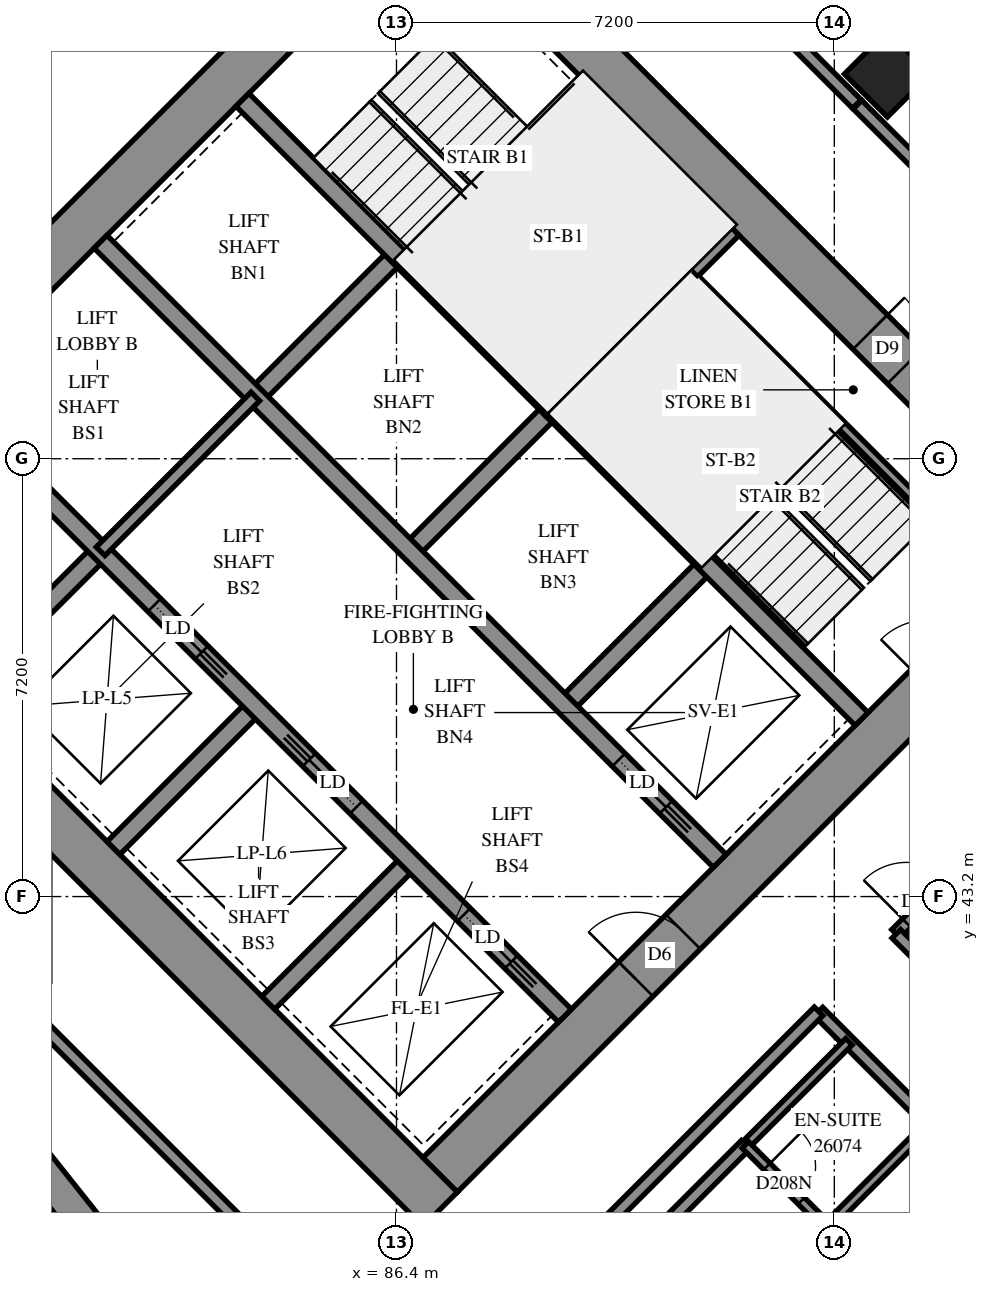
"""IFC4 building model, lengths in metres.
Left out: names, types, materials, properties, quantities, classifications, styles, units other than length and angle.
Written with IfcOpenShell. Run it as: python <this file> out.ifc"""

import sys

from ifc_helpers import new_model, si_unit, direction, frame, frame_2d, origin, origin_2d, place, context, subcontext, project, spatial, polyline, rectangle, outline, extrude, element, fill, save


model = new_model("IFC4")
c1 = context("Model", 3, precision=1e-05, world=origin(), true_north=direction((0.0, 1.0)))
c2 = subcontext(c1, "Body", "Model", "MODEL_VIEW")
j1 = project(units=[si_unit("LENGTHUNIT", "METRE"), si_unit("PLANEANGLEUNIT", "RADIAN")], contexts=[c1])
p1 = place(None, origin())
s1 = spatial("IfcSite", under=j1, at=p1, CompositionType="ELEMENT")
p2 = place(p1, origin())
s2 = spatial("IfcBuilding", under=s1, at=p2, CompositionType="ELEMENT")
p3 = place(p2, frame((0.0, 0.0, 98.2)))
s3 = spatial("IfcBuildingStorey", under=s2, at=p3, CompositionType="ELEMENT", Elevation=98.2)
p4 = place(p3, frame((94.474, 56.727, 0.0), z_axis=(0.0, 0.0, 1.0), x_axis=(0.7071067812, -0.7071067812, 0.0)))
e1 = element("IfcColumn", 1, at=p4, inside=s3, PredefinedType="COLUMN", context=c2, shape_type="SweptSolid", body=[
    extrude(rectangle(XDim=1.0, YDim=1.0, at=origin_2d()), origin(), (0.0, 0.0, 1.0), 3.1),
])
p5 = place(p3, frame((75.806, 49.373, -0.3), z_axis=(0.0, 0.0, 1.0), x_axis=(0.7071067812, -0.7071067812, 0.0)))
e2 = element("IfcWall", 2, at=p5, inside=s3, PredefinedType="SHEAR", context=c2, shape_type="SweptSolid", body=[
    extrude(rectangle(XDim=16.0, YDim=0.8, at=frame_2d((8.0, 0.0))), origin(), (0.0, 0.0, 1.0), 2.7),
])
p6 = place(p3, frame((86.554, 60.121, -0.3), z_axis=(0.0, 0.0, 1.0), x_axis=(0.7071067812, -0.7071067812, 0.0)))
e3 = element("IfcWall", 3, at=p6, inside=s3, PredefinedType="SHEAR", context=c2, shape_type="SweptSolid", body=[
    extrude(rectangle(XDim=16.0, YDim=0.8, at=frame_2d((8.0, 0.0))), origin(), (0.0, 0.0, 1.0), 2.7),
])
p7 = place(p6, frame((10.8, 0.0, 0.3)))
e4 = element("IfcOpeningElement", 4, at=p7, cuts=e3, PredefinedType="OPENING", context=c2, shape_type="SweptSolid", body=[
    extrude(rectangle(XDim=0.8, YDim=2.1, at=frame_2d((0.4, 1.05))), frame((0.0, 0.41, 0.0), z_axis=(0.0, -1.0, 0.0), x_axis=(1.0, 0.0, 0.0)), (0.0, 0.0, 1.0), 0.82),
])
p8 = place(p3, frame((76.372, 49.373, -0.3), z_axis=(0.0, 0.0, 1.0), x_axis=(0.7071067812, 0.7071067812, 0.0)))
e5 = element("IfcWall", 5, at=p8, inside=s3, PredefinedType="SHEAR", context=c2, shape_type="SweptSolid", body=[
    extrude(rectangle(XDim=14.4, YDim=0.8, at=frame_2d((7.2, 0.0))), origin(), (0.0, 0.0, 1.0), 2.7),
])
p9 = place(p8, frame((4.55, 0.0, 0.3)))
e6 = element("IfcOpeningElement", 6, at=p9, cuts=e5, PredefinedType="OPENING", context=c2, shape_type="SweptSolid", body=[
    extrude(rectangle(XDim=1.1, YDim=2.1, at=frame_2d((0.55, 1.05))), frame((0.0, 0.41, 0.0), z_axis=(0.0, -1.0, 0.0), x_axis=(1.0, 0.0, 0.0)), (0.0, 0.0, 1.0), 0.82),
])
p10 = place(p8, frame((11.35, 0.0, 0.3)))
e7 = element("IfcOpeningElement", 7, at=p10, cuts=e5, PredefinedType="OPENING", context=c2, shape_type="SweptSolid", body=[
    extrude(rectangle(XDim=1.1, YDim=2.1, at=frame_2d((0.55, 1.05))), frame((0.0, 0.41, 0.0), z_axis=(0.0, -1.0, 0.0), x_axis=(1.0, 0.0, 0.0)), (0.0, 0.0, 1.0), 0.82),
])
p11 = place(p3, frame((87.12, 38.625, -0.3), z_axis=(0.0, 0.0, 1.0), x_axis=(0.7071067812, 0.7071067812, 0.0)))
e8 = element("IfcWall", 8, at=p11, inside=s3, PredefinedType="SHEAR", context=c2, shape_type="SweptSolid", body=[
    extrude(rectangle(XDim=14.4, YDim=0.8, at=frame_2d((7.2, 0.0))), origin(), (0.0, 0.0, 1.0), 2.7),
])
p12 = place(p11, frame((4.55, 0.0, 0.3)))
e9 = element("IfcOpeningElement", 9, at=p12, cuts=e8, PredefinedType="OPENING", context=c2, shape_type="SweptSolid", body=[
    extrude(rectangle(XDim=1.1, YDim=2.1, at=frame_2d((0.55, 1.05))), frame((0.0, 0.41, 0.0), z_axis=(0.0, -1.0, 0.0), x_axis=(1.0, 0.0, 0.0)), (0.0, 0.0, 1.0), 0.82),
])
p13 = place(p11, frame((11.35, 0.0, 0.3)))
e10 = element("IfcOpeningElement", 10, at=p13, cuts=e8, PredefinedType="OPENING", context=c2, shape_type="SweptSolid", body=[
    extrude(rectangle(XDim=1.1, YDim=2.1, at=frame_2d((0.55, 1.05))), frame((0.0, 0.41, 0.0), z_axis=(0.0, -1.0, 0.0), x_axis=(1.0, 0.0, 0.0)), (0.0, 0.0, 1.0), 0.82),
])
for number, where, z_axis, x_axis in (
    (11, (79.2, 46.544, 0.0), (0.0, 0.0, 1.0), (0.707, 0.707, 0.0)),
    (12, (84.079, 51.423, 0.0), (0.0, 0.0, 1.0), (0.707, 0.707, 0.0)),
):
    element("IfcWall", number, at=place(p3, frame(where, z_axis=z_axis, x_axis=x_axis)), inside=s3, PredefinedType="SOLIDWALL", context=c2, shape_type="SweptSolid", body=[
        extrude(rectangle(XDim=3.3, YDim=0.3, at=frame_2d((1.65, 0.0))), origin(), (0.0, 0.0, 1.0), 3.1),
    ])
p14 = place(p3, frame((81.746, 43.999, 0.0), z_axis=(0.0, 0.0, 1.0), x_axis=(0.7071067812, 0.7071067812, 0.0)))
e13 = element("IfcWall", 13, at=p14, inside=s3, PredefinedType="SOLIDWALL", context=c2, shape_type="SweptSolid", body=[
    extrude(rectangle(XDim=3.3, YDim=0.3, at=frame_2d((1.65, 0.0))), origin(), (0.0, 0.0, 1.0), 3.1),
])
p15 = place(p3, frame((86.625, 48.878, 0.0), z_axis=(0.0, 0.0, 1.0), x_axis=(0.7071067812, 0.7071067812, 0.0)))
e14 = element("IfcWall", 14, at=p15, inside=s3, PredefinedType="SOLIDWALL", context=c2, shape_type="SweptSolid", body=[
    extrude(rectangle(XDim=3.3, YDim=0.3, at=frame_2d((1.65, 0.0))), origin(), (0.0, 0.0, 1.0), 3.1),
])
p16 = place(p3, frame((84.291, 41.453, 0.0), z_axis=(0.0, 0.0, 1.0), x_axis=(0.7071067812, 0.7071067812, 0.0)))
e15 = element("IfcWall", 15, at=p16, inside=s3, PredefinedType="SOLIDWALL", context=c2, shape_type="SweptSolid", body=[
    extrude(rectangle(XDim=3.3, YDim=0.3, at=frame_2d((1.65, 0.0))), origin(), (0.0, 0.0, 1.0), 3.1),
])
p17 = place(p3, frame((89.17, 46.332, 0.0), z_axis=(0.0, 0.0, 1.0), x_axis=(0.7071067812, 0.7071067812, 0.0)))
e16 = element("IfcWall", 16, at=p17, inside=s3, PredefinedType="SOLIDWALL", context=c2, shape_type="SweptSolid", body=[
    extrude(rectangle(XDim=3.3, YDim=0.3, at=frame_2d((1.65, 0.0))), origin(), (0.0, 0.0, 1.0), 3.1),
])
p18 = place(p3, frame((78.988, 51.423, 0.0), z_axis=(0.0, 0.0, 1.0), x_axis=(0.7071067812, -0.7071067812, 0.0)))
e17 = element("IfcWall", 17, at=p18, inside=s3, PredefinedType="SOLIDWALL", context=c2, shape_type="SweptSolid", body=[
    extrude(rectangle(XDim=14.4, YDim=0.3, at=frame_2d((7.2, 0.0))), origin(), (0.0, 0.0, 1.0), 3.1),
])
p19 = place(p18, frame((1.25, 0.0, 0.0)))
e18 = element("IfcOpeningElement", 18, at=p19, cuts=e17, PredefinedType="OPENING", context=c2, shape_type="SweptSolid", body=[
    extrude(rectangle(XDim=1.1, YDim=2.1, at=frame_2d((0.55, 1.05))), frame((0.0, 0.16, 0.0), z_axis=(0.0, -1.0, 0.0), x_axis=(1.0, 0.0, 0.0)), (0.0, 0.0, 1.0), 0.32),
])
p20 = place(p18, frame((4.85, 0.0, 0.0)))
e19 = element("IfcOpeningElement", 19, at=p20, cuts=e17, PredefinedType="OPENING", context=c2, shape_type="SweptSolid", body=[
    extrude(rectangle(XDim=1.1, YDim=2.1, at=frame_2d((0.55, 1.05))), frame((0.0, 0.16, 0.0), z_axis=(0.0, -1.0, 0.0), x_axis=(1.0, 0.0, 0.0)), (0.0, 0.0, 1.0), 0.32),
])
p21 = place(p18, frame((8.45, 0.0, 0.0)))
e20 = element("IfcOpeningElement", 20, at=p21, cuts=e17, PredefinedType="OPENING", context=c2, shape_type="SweptSolid", body=[
    extrude(rectangle(XDim=1.1, YDim=2.1, at=frame_2d((0.55, 1.05))), frame((0.0, 0.16, 0.0), z_axis=(0.0, -1.0, 0.0), x_axis=(1.0, 0.0, 0.0)), (0.0, 0.0, 1.0), 0.32),
])
p22 = place(p18, frame((12.05, 0.0, 0.0)))
e21 = element("IfcOpeningElement", 21, at=p22, cuts=e17, PredefinedType="OPENING", context=c2, shape_type="SweptSolid", body=[
    extrude(rectangle(XDim=1.1, YDim=2.1, at=frame_2d((0.55, 1.05))), frame((0.0, 0.16, 0.0), z_axis=(0.0, -1.0, 0.0), x_axis=(1.0, 0.0, 0.0)), (0.0, 0.0, 1.0), 0.32),
])
p23 = place(p3, frame((81.534, 53.969, 0.0), z_axis=(0.0, 0.0, 1.0), x_axis=(0.707103309, -0.7071102534, 0.0)))
e22 = element("IfcWall", 22, at=p23, inside=s3, PredefinedType="SOLIDWALL", context=c2, shape_type="SweptSolid", body=[
    extrude(rectangle(XDim=14.4, YDim=0.3, at=frame_2d((7.2, 0.0))), origin(), (0.0, 0.0, 1.0), 3.1),
])
p24 = place(p23, frame((12.05, 0.0, 0.0)))
e23 = element("IfcOpeningElement", 23, at=p24, cuts=e22, PredefinedType="OPENING", context=c2, shape_type="SweptSolid", body=[
    extrude(rectangle(XDim=1.1, YDim=2.1, at=frame_2d((0.55, 1.05))), frame((0.0, 0.16, 0.0), z_axis=(0.0, -1.0, 0.0), x_axis=(1.0, 0.0, 0.0)), (0.0, 0.0, 1.0), 0.32),
])
for number, where, z_axis, x_axis in (
    (24, (83.867, 56.302, 0.0), (0.0, 0.0, 1.0), (0.707, -0.707, 0.0)),
    (25, (88.958, 51.211, 0.0), (0.0, 0.0, 1.0), (0.707, -0.707, 0.0)),
):
    element("IfcWall", number, at=place(p3, frame(where, z_axis=z_axis, x_axis=x_axis)), inside=s3, PredefinedType="SOLIDWALL", context=c2, shape_type="SweptSolid", body=[
        extrude(rectangle(XDim=7.2, YDim=0.3, at=frame_2d((3.6, 0.0))), origin(), (0.0, 0.0, 1.0), 3.1),
    ])
p25 = place(p3, frame((88.958, 51.211, 0.0), z_axis=(0.0, 0.0, 1.0), x_axis=(0.7071067812, 0.7071067812, 0.0)))
e26 = element("IfcWall", 26, at=p25, inside=s3, PredefinedType="SOLIDWALL", context=c2, shape_type="SweptSolid", body=[
    extrude(rectangle(XDim=4.2, YDim=0.3, at=frame_2d((2.1, 0.0))), origin(), (0.0, 0.0, 1.0), 3.1),
])
p26 = place(p3, frame((96.069, 56.436, 0.0), z_axis=(0.0, 0.0, 1.0), x_axis=(-0.6082581669, 0.7937392534, 0.0)))
e27 = element("IfcWall", 27, at=p26, inside=s3, PredefinedType="SOLIDWALL", context=c2, shape_type="SweptSolid", body=[
    extrude(outline(polyline([(0.036, -0.275), (3.475, -0.275), (3.403, 0.275), (-0.036, 0.275), (0.036, -0.275)])), origin(), (0.0, 0.0, 1.0), 3.1),
])
p27 = place(p26, frame((1.674, 0.0, 0.5)))
e28 = element("IfcOpeningElement", 28, at=p27, cuts=e27, PredefinedType="OPENING", context=c2, shape_type="SweptSolid", body=[
    extrude(rectangle(XDim=1.2, YDim=2.45, at=frame_2d((0.6, 1.225))), frame((0.0, 0.285, 0.0), z_axis=(0.0, -1.0, 0.0), x_axis=(1.0, 0.0, 0.0)), (0.0, 0.0, 1.0), 0.57),
])
p28 = place(p3, frame((80.234, 39.116, 0.0), z_axis=(0.0, 0.0, 1.0), x_axis=(0.6221724239, -0.782880243, 0.0)))
e29 = element("IfcWall", 29, at=p28, inside=s3, PredefinedType="SOLIDWALL", context=c2, shape_type="SweptSolid", body=[
    extrude(outline(polyline([(0.052, -0.275), (4.02, -0.275), (3.957, 0.275), (-0.052, 0.275), (0.052, -0.275)])), origin(), (0.0, 0.0, 1.0), 3.1),
])
p29 = place(p28, frame((1.891, 0.0, 0.5)))
e30 = element("IfcOpeningElement", 30, at=p29, cuts=e29, PredefinedType="OPENING", context=c2, shape_type="SweptSolid", body=[
    extrude(rectangle(XDim=1.2, YDim=2.45, at=frame_2d((0.6, 1.225))), frame((0.0, 0.285, 0.0), z_axis=(0.0, -1.0, 0.0), x_axis=(1.0, 0.0, 0.0)), (0.0, 0.0, 1.0), 0.57),
])
p30 = place(p3, frame((91.313, 53.354, 0.0), z_axis=(0.0, 0.0, 1.0), x_axis=(0.7071147811, -0.7070987812, 0.0)))
e31 = element("IfcWall", 31, at=p30, inside=s3, PredefinedType="PARTITIONING", context=c2, shape_type="SweptSolid", body=[
    extrude(rectangle(XDim=6.25, YDim=0.15, at=frame_2d((3.125, 0.0))), origin(), (0.0, 0.0, 1.0), 3.1),
])
p31 = place(p3, frame((81.534, 48.878, 0.0), z_axis=(0.0, 0.0, 1.0), x_axis=(0.707092892, 0.7071206701, 0.0)))
e32 = element("IfcWall", 32, at=p31, inside=s3, PredefinedType="PARTITIONING", context=c2, shape_type="SweptSolid", body=[
    extrude(rectangle(XDim=3.6, YDim=0.2, at=frame_2d((1.8, 0.0))), origin(), (0.0, 0.0, 1.0), 3.1),
])
p32 = place(p3, frame((93.339, 41.309, 0.0), z_axis=(0.0, 0.0, 1.0), x_axis=(0.7071067812, -0.7071067812, 0.0)))
e33 = element("IfcWall", 33, at=p32, inside=s3, PredefinedType="PARTITIONING", context=c2, shape_type="SweptSolid", body=[
    extrude(rectangle(XDim=18.702, YDim=0.2, at=frame_2d((9.351, 0.0))), origin(), (0.0, 0.0, 1.0), 3.1),
])
p33 = place(p32, frame((3.05, 0.0, 0.0)))
e34 = element("IfcOpeningElement", 34, at=p33, cuts=e33, PredefinedType="OPENING", context=c2, shape_type="SweptSolid", body=[
    extrude(rectangle(XDim=0.9, YDim=2.1, at=frame_2d((0.45, 1.05))), frame((0.0, 0.11, 0.0), z_axis=(0.0, -1.0, 0.0), x_axis=(1.0, 0.0, 0.0)), (0.0, 0.0, 1.0), 0.22),
])
p34 = place(p32, frame((4.7, 0.0, 0.0)))
e35 = element("IfcOpeningElement", 35, at=p34, cuts=e33, PredefinedType="OPENING", context=c2, shape_type="SweptSolid", body=[
    extrude(rectangle(XDim=0.9, YDim=2.1, at=frame_2d((0.45, 1.05))), frame((0.0, 0.11, 0.0), z_axis=(0.0, -1.0, 0.0), x_axis=(1.0, 0.0, 0.0)), (0.0, 0.0, 1.0), 0.22),
])
p35 = place(p32, frame((10.149, 0.0, 0.0)))
e36 = element("IfcOpeningElement", 36, at=p35, cuts=e33, PredefinedType="OPENING", context=c2, shape_type="SweptSolid", body=[
    extrude(rectangle(XDim=0.9, YDim=2.1, at=frame_2d((0.45, 1.05))), frame((0.0, 0.11, 0.0), z_axis=(0.0, -1.0, 0.0), x_axis=(1.0, 0.0, 0.0)), (0.0, 0.0, 1.0), 0.22),
])
p36 = place(p32, frame((11.9, 0.0, 0.0)))
e37 = element("IfcOpeningElement", 37, at=p36, cuts=e33, PredefinedType="OPENING", context=c2, shape_type="SweptSolid", body=[
    extrude(rectangle(XDim=0.9, YDim=2.1, at=frame_2d((0.45, 1.05))), frame((0.0, 0.11, 0.0), z_axis=(0.0, -1.0, 0.0), x_axis=(1.0, 0.0, 0.0)), (0.0, 0.0, 1.0), 0.22),
])
p37 = place(p32, frame((17.45, 0.0, 0.0)))
e38 = element("IfcOpeningElement", 38, at=p37, cuts=e33, PredefinedType="OPENING", context=c2, shape_type="SweptSolid", body=[
    extrude(rectangle(XDim=0.9, YDim=2.1, at=frame_2d((0.45, 1.05))), frame((0.0, 0.11, 0.0), z_axis=(0.0, -1.0, 0.0), x_axis=(1.0, 0.0, 0.0)), (0.0, 0.0, 1.0), 0.22),
])
p38 = place(p3, frame((86.835, 34.806, 0.0), z_axis=(0.0, 0.0, 1.0), x_axis=(0.7071067812, 0.7071067812, 0.0)))
e39 = element("IfcWall", 39, at=p38, inside=s3, PredefinedType="PARTITIONING", context=c2, shape_type="SweptSolid", body=[
    extrude(rectangle(XDim=9.201, YDim=0.2, at=frame_2d((4.601, 0.0))), origin(), (0.0, 0.0, 1.0), 3.1),
])
p39 = place(p3, frame((94.615, 42.587, 0.0), z_axis=(0.0, 0.0, 1.0), x_axis=(0.7071067812, 0.7071067812, 0.0)))
e40 = element("IfcWall", 40, at=p39, inside=s3, PredefinedType="PARTITIONING", context=c2, shape_type="SweptSolid", body=[
    extrude(rectangle(XDim=9.198, YDim=0.2, at=frame_2d((4.599, 0.0))), origin(), (0.0, 0.0, 1.0), 3.1),
])
p40 = place(p39, frame((0.248, 0.0, 0.0)))
e41 = element("IfcOpeningElement", 41, at=p40, cuts=e40, PredefinedType="OPENING", context=c2, shape_type="SweptSolid", body=[
    extrude(rectangle(XDim=1.0, YDim=2.1, at=frame_2d((0.5, 1.05))), frame((0.0, 0.11, 0.0), z_axis=(0.0, -1.0, 0.0), x_axis=(1.0, 0.0, 0.0)), (0.0, 0.0, 1.0), 0.22),
])
p41 = place(p3, frame((86.341, 33.315, 0.0), z_axis=(0.0, 0.0, 1.0), x_axis=(0.7069849041, 0.7072286373, 0.0)))
e42 = element("IfcWall", 42, at=p41, inside=s3, PredefinedType="PARTITIONING", context=c2, shape_type="SweptSolid", body=[
    extrude(rectangle(XDim=8.206, YDim=0.2, at=frame_2d((4.103, 0.0))), origin(), (0.0, 0.0, 1.0), 3.1),
])
p42 = place(p3, frame((94.62, 42.587, 0.0), z_axis=(0.0, 0.0, 1.0), x_axis=(0.7071067812, -0.7071067812, 0.0)))
e43 = element("IfcWall", 43, at=p42, inside=s3, PredefinedType="PARTITIONING", context=c2, shape_type="SweptSolid", body=[
    extrude(rectangle(XDim=7.9, YDim=0.2, at=frame_2d((3.95, 0.0))), origin(), (0.0, 0.0, 1.0), 3.1),
])
p43 = place(p42, frame((2.998, 0.0, 0.0)))
e44 = element("IfcOpeningElement", 44, at=p43, cuts=e43, PredefinedType="OPENING", context=c2, shape_type="SweptSolid", body=[
    extrude(rectangle(XDim=0.9, YDim=2.1, at=frame_2d((0.45, 1.05))), frame((0.0, 0.11, 0.0), z_axis=(0.0, -1.0, 0.0), x_axis=(1.0, 0.0, 0.0)), (0.0, 0.0, 1.0), 0.22),
])
p44 = place(p42, frame((4.649, 0.0, 0.0)))
e45 = element("IfcOpeningElement", 45, at=p44, cuts=e43, PredefinedType="OPENING", context=c2, shape_type="SweptSolid", body=[
    extrude(rectangle(XDim=0.9, YDim=2.1, at=frame_2d((0.45, 1.05))), frame((0.0, 0.11, 0.0), z_axis=(0.0, -1.0, 0.0), x_axis=(1.0, 0.0, 0.0)), (0.0, 0.0, 1.0), 0.22),
])
p45 = place(p3, frame((88.889, 61.315, 0.0), z_axis=(0.0, 0.0, 1.0), x_axis=(0.7071067812, -0.7071067812, 0.0)))
e46 = element("IfcWall", 46, at=p45, inside=s3, PredefinedType="PARTITIONING", context=c2, shape_type="SweptSolid", body=[
    extrude(rectangle(XDim=7.187, YDim=0.2, at=frame_2d((3.594, 0.0))), origin(), (0.0, 0.0, 1.0), 3.1),
])
p46 = place(p3, frame((93.981, 56.223, 0.0), z_axis=(0.0, 0.0, 1.0), x_axis=(0.7071067812, -0.7071067812, 0.0)))
e47 = element("IfcWall", 47, at=p46, inside=s3, PredefinedType="PARTITIONING", context=c2, shape_type="SweptSolid", body=[
    extrude(rectangle(XDim=7.184, YDim=0.2, at=frame_2d((3.592, 0.0))), origin(), (0.0, 0.0, 1.0), 3.1),
])
p47 = place(p3, frame((80.197, 41.453, 0.0), z_axis=(0.0, 0.0, 1.0), x_axis=(0.7071067812, -0.7071067812, 0.0)))
e48 = element("IfcWall", 48, at=p47, inside=s3, PredefinedType="PARTITIONING", context=c2, shape_type="SweptSolid", body=[
    extrude(rectangle(XDim=6.488, YDim=0.2, at=frame_2d((3.244, 0.0))), origin(), (0.0, 0.0, 1.0), 3.1),
])
for number, where, z_axis, x_axis in (
    (49, (92.143, 39.117, 0.0), (0.0, 0.0, 1.0), (0.708, 0.707, 0.0)),
    (50, (93.487, 37.773, 0.0), (0.0, 0.0, 1.0), (0.707, 0.708, 0.0)),
):
    element("IfcWall", number, at=place(p3, frame(where, z_axis=z_axis, x_axis=x_axis)), inside=s3, PredefinedType="PARTITIONING", context=c2, shape_type="SweptSolid", body=[
        extrude(rectangle(XDim=2.4, YDim=0.15, at=frame_2d((1.2, 0.0))), origin(), (0.0, 0.0, 1.0), 3.1),
    ])
p48 = place(p3, frame((92.137, 39.117, 0.0), z_axis=(0.0, 0.0, 1.0), x_axis=(0.7071067812, -0.7071067812, 0.0)))
e51 = element("IfcWall", 51, at=p48, inside=s3, PredefinedType="PARTITIONING", context=c2, shape_type="SweptSolid", body=[
    extrude(rectangle(XDim=1.901, YDim=0.15, at=frame_2d((0.95, 0.0))), origin(), (0.0, 0.0, 1.0), 3.1),
])
p49 = place(p48, frame((0.502, 0.0, 0.0)))
e52 = element("IfcOpeningElement", 52, at=p49, cuts=e51, PredefinedType="OPENING", context=c2, shape_type="SweptSolid", body=[
    extrude(rectangle(XDim=0.8, YDim=2.1, at=frame_2d((0.4, 1.05))), frame((0.0, 0.085, 0.0), z_axis=(0.0, -1.0, 0.0), x_axis=(1.0, 0.0, 0.0)), (0.0, 0.0, 1.0), 0.17),
])
p50 = place(p3, frame((79.802, 56.623, 0.0), z_axis=(0.0, 0.0, 1.0), x_axis=(0.7071067812, 0.7071067812, 0.0)))
e53 = element("IfcWall", 53, at=p50, inside=s3, PredefinedType="PARTITIONING", context=c2, shape_type="SweptSolid", body=[
    extrude(rectangle(XDim=1.623, YDim=0.2, at=frame_2d((0.812, 0.0))), origin(), (0.0, 0.0, 1.0), 3.1),
])
p51 = place(p7, origin())
e54 = element("IfcDoor", 54, at=p51, inside=s3, OperationType="SINGLE_SWING_RIGHT", PredefinedType="DOOR", context=c2, shape_type="SweptSolid", body=[
    extrude(rectangle(XDim=0.8, YDim=2.1, at=frame_2d((0.4, 1.05))), frame((0.0, -0.34, 0.0), z_axis=(0.0, -1.0, 0.0), x_axis=(1.0, 0.0, 0.0)), (0.0, 0.0, 1.0), 0.05),
])
fill(e4, e54)
p52 = place(p12, origin())
e55 = element("IfcDoor", 55, at=p52, inside=s3, OperationType="DOUBLE_DOOR_SINGLE_SWING", PredefinedType="DOOR", context=c2, shape_type="SweptSolid", body=[
    extrude(rectangle(XDim=1.1, YDim=2.1, at=frame_2d((0.55, 1.05))), frame((0.0, 0.025, 0.0), z_axis=(0.0, -1.0, 0.0), x_axis=(1.0, 0.0, 0.0)), (0.0, 0.0, 1.0), 0.05),
])
fill(e9, e55)
p53 = place(p20, origin())
e56 = element("IfcDoor", 56, at=p53, inside=s3, OperationType="SLIDING_TO_RIGHT", PredefinedType="DOOR", context=c2, shape_type="SweptSolid", body=[
    extrude(rectangle(XDim=1.1, YDim=2.1, at=frame_2d((0.55, 1.05))), frame((0.0, 0.025, 0.0), z_axis=(0.0, -1.0, 0.0), x_axis=(1.0, 0.0, 0.0)), (0.0, 0.0, 1.0), 0.05),
])
fill(e19, e56)
p54 = place(p21, origin())
e57 = element("IfcDoor", 57, at=p54, inside=s3, OperationType="SLIDING_TO_LEFT", PredefinedType="DOOR", context=c2, shape_type="SweptSolid", body=[
    extrude(rectangle(XDim=1.1, YDim=2.1, at=frame_2d((0.55, 1.05))), frame((0.0, 0.025, 0.0), z_axis=(0.0, -1.0, 0.0), x_axis=(1.0, 0.0, 0.0)), (0.0, 0.0, 1.0), 0.05),
])
fill(e20, e57)
p55 = place(p22, origin())
e58 = element("IfcDoor", 58, at=p55, inside=s3, OperationType="SLIDING_TO_RIGHT", PredefinedType="DOOR", context=c2, shape_type="SweptSolid", body=[
    extrude(rectangle(XDim=1.1, YDim=2.1, at=frame_2d((0.55, 1.05))), frame((0.0, 0.025, 0.0), z_axis=(0.0, -1.0, 0.0), x_axis=(1.0, 0.0, 0.0)), (0.0, 0.0, 1.0), 0.05),
])
fill(e21, e58)
p56 = place(p24, origin())
e59 = element("IfcDoor", 59, at=p56, inside=s3, OperationType="SLIDING_TO_RIGHT", PredefinedType="DOOR", context=c2, shape_type="SweptSolid", body=[
    extrude(rectangle(XDim=1.1, YDim=2.1, at=frame_2d((0.55, 1.05))), frame((0.0, 0.025, 0.0), z_axis=(0.0, -1.0, 0.0), x_axis=(1.0, 0.0, 0.0)), (0.0, 0.0, 1.0), 0.05),
])
fill(e23, e59)
p57 = place(p40, origin())
e60 = element("IfcDoor", 60, at=p57, inside=s3, OperationType="SINGLE_SWING_RIGHT", PredefinedType="DOOR", context=c2, shape_type="SweptSolid", body=[
    extrude(rectangle(XDim=1.0, YDim=2.1, at=frame_2d((0.5, 1.05))), frame((0.0, 0.025, 0.0), z_axis=(0.0, -1.0, 0.0), x_axis=(1.0, 0.0, 0.0)), (0.0, 0.0, 1.0), 0.05),
])
fill(e41, e60)
p58 = place(p49, origin())
e61 = element("IfcDoor", 61, at=p58, inside=s3, OperationType="SINGLE_SWING_RIGHT", PredefinedType="DOOR", context=c2, shape_type="SweptSolid", body=[
    extrude(rectangle(XDim=0.8, YDim=2.1, at=frame_2d((0.4, 1.05))), frame((0.0, 0.025, 0.0), z_axis=(0.0, -1.0, 0.0), x_axis=(1.0, 0.0, 0.0)), (0.0, 0.0, 1.0), 0.05),
])
fill(e52, e61)
save(model, sys.argv[1])
